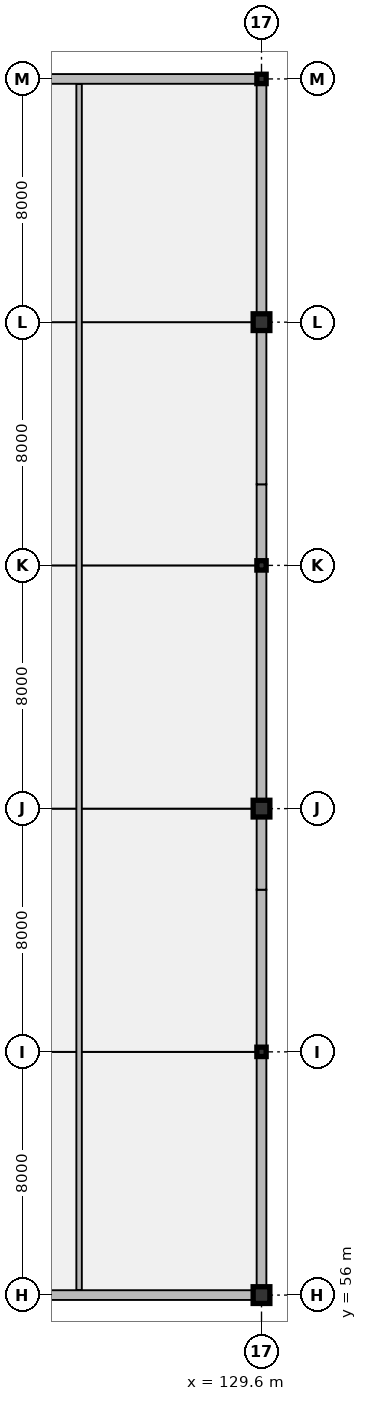
"""IFC4 building model, lengths in metres.
Left out: names, types, materials, properties, quantities, classifications, styles, units other than length and angle.
Written with IfcOpenShell. Run it as: python <this file> out.ifc"""

import sys

from ifc_helpers import new_model, si_unit, direction, frame, frame_2d, origin, origin_2d, place, context, subcontext, project, spatial, rectangle, i_section, extrude, element, fill, save


model = new_model("IFC4")
c1 = context("Model", 3, precision=1e-05, world=origin(), true_north=direction((0.0, 1.0)))
c2 = subcontext(c1, "Body", "Model", "MODEL_VIEW")
j1 = project(units=[si_unit("LENGTHUNIT", "METRE"), si_unit("PLANEANGLEUNIT", "RADIAN")], contexts=[c1])
p1 = place(None, origin())
s1 = spatial("IfcSite", under=j1, at=p1, CompositionType="ELEMENT")
p2 = place(p1, origin())
s2 = spatial("IfcBuilding", under=s1, at=p2, CompositionType="ELEMENT")
p3 = place(p2, frame((0.0, 0.0, 19.8)))
s3 = spatial("IfcBuildingStorey", under=s2, at=p3, CompositionType="ELEMENT", Elevation=19.8)
p4 = place(p3, frame((129.6, 56.0, 0.0), z_axis=(0.0, 0.0, 1.0), x_axis=(1.0, 0.0, 0.0)))
e1 = element("IfcColumn", 1, at=p4, inside=s3, PredefinedType="COLUMN", context=c2, shape_type="SweptSolid", body=[
    extrude(rectangle(XDim=0.55, YDim=0.55, at=origin_2d()), origin(), (0.0, 0.0, 1.0), 4.86),
])
p5 = place(p3, frame((129.6, 64.0, 0.0), z_axis=(0.0, 0.0, 1.0), x_axis=(1.0, 0.0, 0.0)))
e2 = element("IfcColumn", 2, at=p5, inside=s3, PredefinedType="COLUMN", context=c2, shape_type="SweptSolid", body=[
    extrude(i_section(OverallWidth=0.305, OverallDepth=0.308, WebThickness=0.01, FlangeThickness=0.015, FilletRadius=0.015, at=origin_2d()), origin(), (0.0, 0.0, 1.0), 4.86),
])
p6 = place(p3, frame((129.6, 72.0, 0.0), z_axis=(0.0, 0.0, 1.0), x_axis=(1.0, 0.0, 0.0)))
e3 = element("IfcColumn", 3, at=p6, inside=s3, PredefinedType="COLUMN", context=c2, shape_type="SweptSolid", body=[
    extrude(rectangle(XDim=0.55, YDim=0.55, at=origin_2d()), origin(), (0.0, 0.0, 1.0), 4.86),
])
p7 = place(p3, frame((129.6, 80.0, 0.0), z_axis=(0.0, 0.0, 1.0), x_axis=(1.0, 0.0, 0.0)))
e4 = element("IfcColumn", 4, at=p7, inside=s3, PredefinedType="COLUMN", context=c2, shape_type="SweptSolid", body=[
    extrude(i_section(OverallWidth=0.305, OverallDepth=0.308, WebThickness=0.01, FlangeThickness=0.015, FilletRadius=0.015, at=origin_2d()), origin(), (0.0, 0.0, 1.0), 4.86),
])
p8 = place(p3, frame((129.6, 88.0, 0.0), z_axis=(0.0, 0.0, 1.0), x_axis=(1.0, 0.0, 0.0)))
e5 = element("IfcColumn", 5, at=p8, inside=s3, PredefinedType="COLUMN", context=c2, shape_type="SweptSolid", body=[
    extrude(rectangle(XDim=0.55, YDim=0.55, at=origin_2d()), origin(), (0.0, 0.0, 1.0), 4.86),
])
p9 = place(p3, frame((129.6, 96.0, 0.0), z_axis=(0.0, 0.0, 1.0), x_axis=(1.0, 0.0, 0.0)))
e6 = element("IfcColumn", 6, at=p9, inside=s3, PredefinedType="COLUMN", context=c2, shape_type="SweptSolid", body=[
    extrude(i_section(OverallWidth=0.305, OverallDepth=0.308, WebThickness=0.01, FlangeThickness=0.015, FilletRadius=0.015, at=origin_2d()), origin(), (0.0, 0.0, 1.0), 4.86),
])
p10 = place(p3, frame((129.6, 56.0, 0.0), z_axis=(0.0, 0.0, 1.0), x_axis=(0.0, 1.0, 0.0)))
e7 = element("IfcWall", 7, at=p10, inside=s3, PredefinedType="SOLIDWALL", context=c2, shape_type="SweptSolid", body=[
    extrude(rectangle(XDim=13.333, YDim=0.32, at=frame_2d((6.667, 0.0))), origin(), (0.0, 0.0, 1.0), 4.66),
])
p11 = place(p10, frame((3.6, 0.0, 0.95)))
e8 = element("IfcOpeningElement", 8, at=p11, cuts=e7, PredefinedType="OPENING", context=c2, shape_type="SweptSolid", body=[
    extrude(rectangle(XDim=1.8, YDim=1.5, at=frame_2d((0.9, 0.75))), frame((0.0, 0.17, 0.0), z_axis=(0.0, -1.0, 0.0), x_axis=(1.0, 0.0, 0.0)), (0.0, 0.0, 1.0), 0.34),
])
p12 = place(p3, frame((129.6, 69.333, 0.0), z_axis=(0.0, 0.0, 1.0), x_axis=(0.0, 1.0, 0.0)))
e9 = element("IfcWall", 9, at=p12, inside=s3, PredefinedType="SOLIDWALL", context=c2, shape_type="SweptSolid", body=[
    extrude(rectangle(XDim=13.333, YDim=0.32, at=frame_2d((6.667, 0.0))), origin(), (0.0, 0.0, 1.0), 4.66),
])
p13 = place(p12, frame((5.85, 0.0, 0.95)))
e10 = element("IfcOpeningElement", 10, at=p13, cuts=e9, PredefinedType="OPENING", context=c2, shape_type="SweptSolid", body=[
    extrude(rectangle(XDim=1.8, YDim=1.8, at=frame_2d((0.9, 0.9))), frame((0.0, 0.17, 0.0), z_axis=(0.0, -1.0, 0.0), x_axis=(1.0, 0.0, 0.0)), (0.0, 0.0, 1.0), 0.34),
])
p14 = place(p3, frame((129.6, 82.667, 0.0), z_axis=(0.0, 0.0, 1.0), x_axis=(0.0, 1.0, 0.0)))
e11 = element("IfcWall", 11, at=p14, inside=s3, PredefinedType="SOLIDWALL", context=c2, shape_type="SweptSolid", body=[
    extrude(rectangle(XDim=13.333, YDim=0.32, at=frame_2d((6.667, 0.0))), origin(), (0.0, 0.0, 1.0), 4.66),
])
p15 = place(p14, frame((8.1, 0.0, 0.85)))
e12 = element("IfcOpeningElement", 12, at=p15, cuts=e11, PredefinedType="OPENING", context=c2, shape_type="SweptSolid", body=[
    extrude(rectangle(XDim=1.8, YDim=2.1, at=frame_2d((0.9, 1.05))), frame((0.0, 0.17, 0.0), z_axis=(0.0, -1.0, 0.0), x_axis=(1.0, 0.0, 0.0)), (0.0, 0.0, 1.0), 0.34),
])
p16 = place(p3, frame((129.6, 96.0, 0.0), z_axis=(0.0, 0.0, 1.0), x_axis=(-1.0, 0.0, 0.0)))
e13 = element("IfcWall", 13, at=p16, inside=s3, PredefinedType="SOLIDWALL", context=c2, shape_type="SweptSolid", body=[
    extrude(rectangle(XDim=12.06, YDim=0.32, at=frame_2d((6.03, 0.0))), origin(), (0.0, 0.0, 1.0), 4.86),
])
p17 = place(p16, frame((3.15, 0.0, 0.85)))
e14 = element("IfcOpeningElement", 14, at=p17, cuts=e13, PredefinedType="OPENING", context=c2, shape_type="SweptSolid", body=[
    extrude(rectangle(XDim=1.8, YDim=2.4, at=frame_2d((0.9, 1.2))), frame((0.0, 0.17, 0.0), z_axis=(0.0, -1.0, 0.0), x_axis=(1.0, 0.0, 0.0)), (0.0, 0.0, 1.0), 0.34),
])
p18 = place(p3, frame((117.45, 56.0, 0.0), z_axis=(0.0, 0.0, 1.0), x_axis=(1.0, 0.0, 0.0)))
e15 = element("IfcWall", 15, at=p18, inside=s3, PredefinedType="SOLIDWALL", context=c2, shape_type="SweptSolid", body=[
    extrude(rectangle(XDim=12.15, YDim=0.32, at=frame_2d((6.075, 0.0))), origin(), (0.0, 0.0, 1.0), 4.86),
])
p19 = place(p18, frame((2.7, 0.0, 0.85)))
e16 = element("IfcOpeningElement", 16, at=p19, cuts=e15, PredefinedType="OPENING", context=c2, shape_type="SweptSolid", body=[
    extrude(rectangle(XDim=2.7, YDim=2.1, at=frame_2d((1.35, 1.05))), frame((0.0, 0.17, 0.0), z_axis=(0.0, -1.0, 0.0), x_axis=(1.0, 0.0, 0.0)), (0.0, 0.0, 1.0), 0.34),
])
p20 = place(p3, frame((123.6, 56.168, 0.0), z_axis=(0.0, 0.0, 1.0), x_axis=(0.0, 1.0, 0.0)))
e17 = element("IfcWall", 17, at=p20, inside=s3, PredefinedType="PARTITIONING", context=c2, shape_type="SweptSolid", body=[
    extrude(rectangle(XDim=39.664, YDim=0.18, at=frame_2d((19.832, 0.0))), origin(), (0.0, 0.0, 1.0), 4.86),
])
p21 = place(p20, frame((19.332, 0.0, 0.0)))
e18 = element("IfcOpeningElement", 18, at=p21, cuts=e17, PredefinedType="OPENING", context=c2, shape_type="SweptSolid", body=[
    extrude(rectangle(XDim=1.0, YDim=2.2, at=frame_2d((0.5, 1.1))), frame((0.0, 0.1, 0.0), z_axis=(0.0, -1.0, 0.0), x_axis=(1.0, 0.0, 0.0)), (0.0, 0.0, 1.0), 0.2),
])
p22 = place(p11, origin())
e19 = element("IfcWindow", 19, at=p22, inside=s3, PartitioningType="DOUBLE_PANEL_VERTICAL", PredefinedType="WINDOW", context=c2, shape_type="SweptSolid", body=[
    extrude(rectangle(XDim=1.8, YDim=1.5, at=frame_2d((0.9, 0.75))), frame((0.0, 0.03, 0.0), z_axis=(0.0, -1.0, 0.0), x_axis=(1.0, 0.0, 0.0)), (0.0, 0.0, 1.0), 0.06),
])
fill(e8, e19)
p23 = place(p13, origin())
e20 = element("IfcWindow", 20, at=p23, inside=s3, PartitioningType="DOUBLE_PANEL_VERTICAL", PredefinedType="WINDOW", context=c2, shape_type="SweptSolid", body=[
    extrude(rectangle(XDim=1.8, YDim=1.8, at=frame_2d((0.9, 0.9))), frame((0.0, 0.03, 0.0), z_axis=(0.0, -1.0, 0.0), x_axis=(1.0, 0.0, 0.0)), (0.0, 0.0, 1.0), 0.06),
])
fill(e10, e20)
p24 = place(p15, origin())
e21 = element("IfcWindow", 21, at=p24, inside=s3, PartitioningType="DOUBLE_PANEL_VERTICAL", PredefinedType="WINDOW", context=c2, shape_type="SweptSolid", body=[
    extrude(rectangle(XDim=1.8, YDim=2.1, at=frame_2d((0.9, 1.05))), frame((0.0, 0.03, 0.0), z_axis=(0.0, -1.0, 0.0), x_axis=(1.0, 0.0, 0.0)), (0.0, 0.0, 1.0), 0.06),
])
fill(e12, e21)
p25 = place(p17, origin())
e22 = element("IfcWindow", 22, at=p25, inside=s3, PartitioningType="TRIPLE_PANEL_VERTICAL", PredefinedType="WINDOW", context=c2, shape_type="SweptSolid", body=[
    extrude(rectangle(XDim=1.8, YDim=2.4, at=frame_2d((0.9, 1.2))), frame((0.0, 0.03, 0.0), z_axis=(0.0, -1.0, 0.0), x_axis=(1.0, 0.0, 0.0)), (0.0, 0.0, 1.0), 0.06),
])
fill(e14, e22)
p26 = place(p19, origin())
e23 = element("IfcWindow", 23, at=p26, inside=s3, PartitioningType="TRIPLE_PANEL_VERTICAL", PredefinedType="WINDOW", context=c2, shape_type="SweptSolid", body=[
    extrude(rectangle(XDim=2.7, YDim=2.1, at=frame_2d((1.35, 1.05))), frame((0.0, 0.03, 0.0), z_axis=(0.0, -1.0, 0.0), x_axis=(1.0, 0.0, 0.0)), (0.0, 0.0, 1.0), 0.06),
])
fill(e16, e23)
p27 = place(p21, frame((1.0, 0.0, 0.0), z_axis=(0.0, 0.0, 1.0), x_axis=(-1.0, 0.0, 0.0)))
e24 = element("IfcDoor", 24, at=p27, inside=s3, OperationType="SINGLE_SWING_RIGHT", PredefinedType="DOOR", context=c2, shape_type="SweptSolid", body=[
    extrude(rectangle(XDim=1.0, YDim=2.2, at=frame_2d((0.5, 1.1))), frame((0.0, 0.025, 0.0), z_axis=(0.0, -1.0, 0.0), x_axis=(1.0, 0.0, 0.0)), (0.0, 0.0, 1.0), 0.05),
])
fill(e18, e24)
save(model, sys.argv[1])
